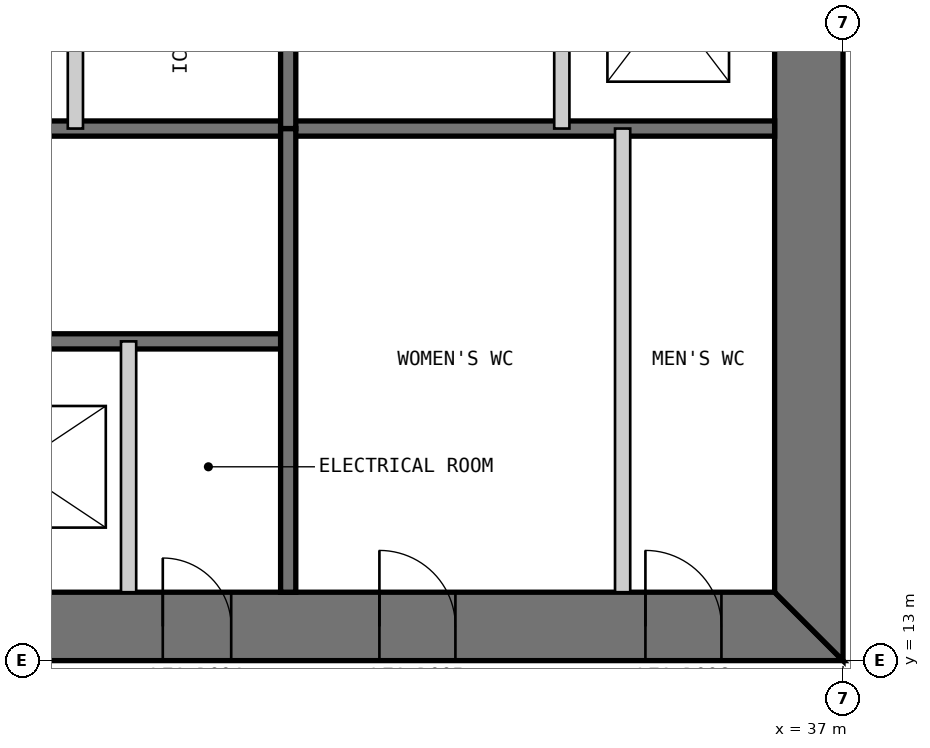
"""IFC4 building model, lengths in metres.
Left out: names, types, materials, properties, quantities, classifications, styles, units other than length and angle.
Written with IfcOpenShell. Run it as: python <this file> out.ifc"""

import sys

from ifc_helpers import new_model, si_unit, direction, frame, frame_2d, origin, place, context, subcontext, project, spatial, polyline, rectangle, outline, extrude, element, fill, save


model = new_model("IFC4")
c1 = context("Model", 3, precision=1e-05, world=origin(), true_north=direction((0.0, 1.0)))
c2 = subcontext(c1, "Body", "Model", "MODEL_VIEW")
j1 = project(units=[si_unit("LENGTHUNIT", "METRE"), si_unit("PLANEANGLEUNIT", "RADIAN")], contexts=[c1])
p1 = place(None, origin())
s1 = spatial("IfcSite", under=j1, at=p1, CompositionType="ELEMENT")
p2 = place(p1, origin())
s2 = spatial("IfcBuilding", under=s1, at=p2, CompositionType="ELEMENT")
p3 = place(p2, frame((0.0, 0.0, 293.4)))
s3 = spatial("IfcBuildingStorey", under=s2, at=p3, CompositionType="ELEMENT", Elevation=293.4)
p4 = place(p3, frame((13.0, 13.45, 0.0), z_axis=(0.0, 0.0, 1.0), x_axis=(1.0, 0.0, 0.0)))
e1 = element("IfcWall", 1, at=p4, inside=s3, PredefinedType="SHEAR", context=c2, shape_type="SweptSolid", body=[
    extrude(outline(polyline([(0.0, -0.45), (24.0, -0.45), (23.1, 0.45), (0.9, 0.45), (0.0, -0.45)])), origin(), (0.0, 0.0, 1.0), 3.4),
])
p5 = place(p4, frame((4.9, 0.0, 0.0)))
e2 = element("IfcOpeningElement", 2, at=p5, cuts=e1, PredefinedType="OPENING", context=c2, shape_type="SweptSolid", body=[
    extrude(rectangle(XDim=1.0, YDim=2.2, at=frame_2d((0.5, 1.1))), frame((0.0, 0.46, 0.0), z_axis=(0.0, -1.0, 0.0), x_axis=(1.0, 0.0, 0.0)), (0.0, 0.0, 1.0), 0.92),
])
p6 = place(p4, frame((8.9, 0.0, 0.0)))
e3 = element("IfcOpeningElement", 3, at=p6, cuts=e1, PredefinedType="OPENING", context=c2, shape_type="SweptSolid", body=[
    extrude(rectangle(XDim=1.1, YDim=2.2, at=frame_2d((0.55, 1.1))), frame((0.0, 0.46, 0.0), z_axis=(0.0, -1.0, 0.0), x_axis=(1.0, 0.0, 0.0)), (0.0, 0.0, 1.0), 0.92),
])
p7 = place(p4, frame((15.05, 0.0, 0.0)))
e4 = element("IfcOpeningElement", 4, at=p7, cuts=e1, PredefinedType="OPENING", context=c2, shape_type="SweptSolid", body=[
    extrude(rectangle(XDim=0.9, YDim=2.2, at=frame_2d((0.45, 1.1))), frame((0.0, 0.46, 0.0), z_axis=(0.0, -1.0, 0.0), x_axis=(1.0, 0.0, 0.0)), (0.0, 0.0, 1.0), 0.92),
])
p8 = place(p4, frame((17.9, 0.0, 0.0)))
e5 = element("IfcOpeningElement", 5, at=p8, cuts=e1, PredefinedType="OPENING", context=c2, shape_type="SweptSolid", body=[
    extrude(rectangle(XDim=1.0, YDim=2.2, at=frame_2d((0.5, 1.1))), frame((0.0, 0.46, 0.0), z_axis=(0.0, -1.0, 0.0), x_axis=(1.0, 0.0, 0.0)), (0.0, 0.0, 1.0), 0.92),
])
p9 = place(p4, frame((21.4, 0.0, 0.0)))
e6 = element("IfcOpeningElement", 6, at=p9, cuts=e1, PredefinedType="OPENING", context=c2, shape_type="SweptSolid", body=[
    extrude(rectangle(XDim=1.0, YDim=2.2, at=frame_2d((0.5, 1.1))), frame((0.0, 0.46, 0.0), z_axis=(0.0, -1.0, 0.0), x_axis=(1.0, 0.0, 0.0)), (0.0, 0.0, 1.0), 0.92),
])
p10 = place(p3, frame((36.55, 13.9, 0.0), z_axis=(0.0, 0.0, 1.0), x_axis=(0.0, 1.0, 0.0)))
e7 = element("IfcWall", 7, at=p10, inside=s3, PredefinedType="SHEAR", context=c2, shape_type="SweptSolid", body=[
    extrude(outline(polyline([(-0.9, -0.45), (23.1, -0.45), (22.2, 0.45), (0.0, 0.45), (-0.9, -0.45)])), origin(), (0.0, 0.0, 1.0), 3.4),
])
p11 = place(p10, frame((20.2, 0.0, 0.0)))
e8 = element("IfcOpeningElement", 8, at=p11, cuts=e7, PredefinedType="OPENING", context=c2, shape_type="SweptSolid", body=[
    extrude(rectangle(XDim=1.0, YDim=2.2, at=frame_2d((0.5, 1.1))), frame((0.0, 0.46, 0.0), z_axis=(0.0, -1.0, 0.0), x_axis=(1.0, 0.0, 0.0)), (0.0, 0.0, 1.0), 0.92),
])
p12 = place(p10, frame((17.25, 0.0, 0.0)))
e9 = element("IfcOpeningElement", 9, at=p12, cuts=e7, PredefinedType="OPENING", context=c2, shape_type="SweptSolid", body=[
    extrude(rectangle(XDim=0.9, YDim=2.2, at=frame_2d((0.45, 1.1))), frame((0.0, 0.46, 0.0), z_axis=(0.0, -1.0, 0.0), x_axis=(1.0, 0.0, 0.0)), (0.0, 0.0, 1.0), 0.92),
])
p13 = place(p3, frame((20.3, 17.2, 0.0), z_axis=(0.0, 0.0, 1.0), x_axis=(1.0, 0.0, 0.0)))
e10 = element("IfcWall", 10, at=p13, inside=s3, PredefinedType="SOLIDWALL", context=c2, shape_type="SweptSolid", body=[
    extrude(rectangle(XDim=9.4, YDim=0.2, at=frame_2d((4.7, 0.0))), origin(), (0.0, 0.0, 1.0), 3.2),
])
p14 = place(p13, frame((0.25, 0.0, 0.0)))
e11 = element("IfcOpeningElement", 11, at=p14, cuts=e10, PredefinedType="OPENING", context=c2, shape_type="SweptSolid", body=[
    extrude(rectangle(XDim=1.0, YDim=2.2, at=frame_2d((0.5, 1.1))), frame((0.0, 0.11, 0.0), z_axis=(0.0, -1.0, 0.0), x_axis=(1.0, 0.0, 0.0)), (0.0, 0.0, 1.0), 0.22),
])
p15 = place(p3, frame((20.3, 20.0, 0.0), z_axis=(0.0, 0.0, 1.0), x_axis=(1.0, 0.0, 0.0)))
e12 = element("IfcWall", 12, at=p15, inside=s3, PredefinedType="SOLIDWALL", context=c2, shape_type="SweptSolid", body=[
    extrude(rectangle(XDim=15.8, YDim=0.2, at=frame_2d((7.9, 0.0))), origin(), (0.0, 0.0, 1.0), 3.2),
])
p16 = place(p3, frame((27.6, 13.9, 0.0), z_axis=(0.0, 0.0, 1.0), x_axis=(0.0, 1.0, 0.0)))
e13 = element("IfcWall", 13, at=p16, inside=s3, PredefinedType="PARTITIONING", context=c2, shape_type="SweptSolid", body=[
    extrude(rectangle(XDim=3.3, YDim=0.2, at=frame_2d((1.65, 0.0))), origin(), (0.0, 0.0, 1.0), 3.2),
])
p17 = place(p3, frame((29.7, 13.9, 0.0), z_axis=(0.0, 0.0, 1.0), x_axis=(0.0, 1.0, 0.0)))
e14 = element("IfcWall", 14, at=p17, inside=s3, PredefinedType="SOLIDWALL", context=c2, shape_type="SweptSolid", body=[
    extrude(rectangle(XDim=6.1, YDim=0.2, at=frame_2d((3.05, 0.0))), origin(), (0.0, 0.0, 1.0), 3.2),
])
p18 = place(p3, frame((34.1, 13.9, 0.0), z_axis=(0.0, 0.0, 1.0), x_axis=(0.0, 1.0, 0.0)))
e15 = element("IfcWall", 15, at=p18, inside=s3, PredefinedType="PARTITIONING", context=c2, shape_type="SweptSolid", body=[
    extrude(rectangle(XDim=6.1, YDim=0.2, at=frame_2d((3.05, 0.0))), origin(), (0.0, 0.0, 1.0), 3.2),
])
p19 = place(p3, frame((33.3, 36.1, 0.0), z_axis=(0.0, 0.0, 1.0), x_axis=(0.0, -1.0, 0.0)))
e16 = element("IfcWall", 16, at=p19, inside=s3, PredefinedType="PARTITIONING", context=c2, shape_type="SweptSolid", body=[
    extrude(rectangle(XDim=16.1, YDim=0.2, at=frame_2d((8.05, 0.0))), origin(), (0.0, 0.0, 1.0), 3.2),
])
p20 = place(p19, frame((4.1, 0.0, 0.0)))
e17 = element("IfcOpeningElement", 17, at=p20, cuts=e16, PredefinedType="OPENING", context=c2, shape_type="SweptSolid", body=[
    extrude(rectangle(XDim=0.9, YDim=2.2, at=frame_2d((0.45, 1.1))), frame((0.0, 0.11, 0.0), z_axis=(0.0, -1.0, 0.0), x_axis=(1.0, 0.0, 0.0)), (0.0, 0.0, 1.0), 0.22),
])
p21 = place(p19, frame((7.217, 0.0, 0.0)))
e18 = element("IfcOpeningElement", 18, at=p21, cuts=e16, PredefinedType="OPENING", context=c2, shape_type="SweptSolid", body=[
    extrude(rectangle(XDim=1.1, YDim=2.2, at=frame_2d((0.55, 1.1))), frame((0.0, 0.11, 0.0), z_axis=(0.0, -1.0, 0.0), x_axis=(1.0, 0.0, 0.0)), (0.0, 0.0, 1.0), 0.22),
])
p22 = place(p19, frame((10.55, 0.0, 0.0)))
e19 = element("IfcOpeningElement", 19, at=p22, cuts=e16, PredefinedType="OPENING", context=c2, shape_type="SweptSolid", body=[
    extrude(rectangle(XDim=1.1, YDim=2.2, at=frame_2d((0.55, 1.1))), frame((0.0, 0.11, 0.0), z_axis=(0.0, -1.0, 0.0), x_axis=(1.0, 0.0, 0.0)), (0.0, 0.0, 1.0), 0.22),
])
p23 = place(p19, frame((13.883, 0.0, 0.0)))
e20 = element("IfcOpeningElement", 20, at=p23, cuts=e16, PredefinedType="OPENING", context=c2, shape_type="SweptSolid", body=[
    extrude(rectangle(XDim=1.1, YDim=2.2, at=frame_2d((0.55, 1.1))), frame((0.0, 0.11, 0.0), z_axis=(0.0, -1.0, 0.0), x_axis=(1.0, 0.0, 0.0)), (0.0, 0.0, 1.0), 0.22),
])
p24 = place(p3, frame((29.7, 36.1, 0.0), z_axis=(0.0, 0.0, 1.0), x_axis=(0.0, -1.0, 0.0)))
e21 = element("IfcWall", 21, at=p24, inside=s3, PredefinedType="SOLIDWALL", context=c2, shape_type="SweptSolid", body=[
    extrude(rectangle(XDim=16.1, YDim=0.2, at=frame_2d((8.05, 0.0))), origin(), (0.0, 0.0, 1.0), 3.2),
])
p25 = place(p24, frame((8.4, 0.0, 0.0)))
e22 = element("IfcOpeningElement", 22, at=p25, cuts=e21, PredefinedType="OPENING", context=c2, shape_type="SweptSolid", body=[
    extrude(rectangle(XDim=0.9, YDim=2.2, at=frame_2d((0.45, 1.1))), frame((0.0, 0.11, 0.0), z_axis=(0.0, -1.0, 0.0), x_axis=(1.0, 0.0, 0.0)), (0.0, 0.0, 1.0), 0.22),
])
p26 = place(p24, frame((13.4, 0.0, 0.0)))
e23 = element("IfcOpeningElement", 23, at=p26, cuts=e21, PredefinedType="OPENING", context=c2, shape_type="SweptSolid", body=[
    extrude(rectangle(XDim=0.9, YDim=2.2, at=frame_2d((0.45, 1.1))), frame((0.0, 0.11, 0.0), z_axis=(0.0, -1.0, 0.0), x_axis=(1.0, 0.0, 0.0)), (0.0, 0.0, 1.0), 0.22),
])
p27 = place(p3, frame((26.9, 30.0, 0.0), z_axis=(0.0, 0.0, 1.0), x_axis=(0.0, -1.0, 0.0)))
e24 = element("IfcWall", 24, at=p27, inside=s3, PredefinedType="PARTITIONING", context=c2, shape_type="SweptSolid", body=[
    extrude(rectangle(XDim=10.0, YDim=0.2, at=frame_2d((5.0, 0.0))), origin(), (0.0, 0.0, 1.0), 3.2),
])
p28 = place(p7, origin())
e25 = element("IfcDoor", 25, at=p28, inside=s3, OperationType="SINGLE_SWING_LEFT", PredefinedType="DOOR", context=c2, shape_type="SweptSolid", body=[
    extrude(rectangle(XDim=0.9, YDim=2.2, at=frame_2d((0.45, 1.1))), frame((0.0, 0.025, 0.0), z_axis=(0.0, -1.0, 0.0), x_axis=(1.0, 0.0, 0.0)), (0.0, 0.0, 1.0), 0.05),
    extrude(outline(polyline([(0.0, 0.0), (0.04, 0.0), (0.04, 2.16), (0.86, 2.16), (0.86, 0.0), (0.9, 0.0), (0.9, 2.2), (0.0, 2.2), (0.0, 0.0)])), frame((0.0, 0.3, 0.0), z_axis=(0.0, -1.0, 0.0), x_axis=(1.0, 0.0, 0.0)), (0.0, 0.0, 1.0), 0.6),
])
fill(e4, e25)
p29 = place(p8, origin())
e26 = element("IfcDoor", 26, at=p29, inside=s3, OperationType="SINGLE_SWING_LEFT", PredefinedType="DOOR", context=c2, shape_type="SweptSolid", body=[
    extrude(rectangle(XDim=1.0, YDim=2.2, at=frame_2d((0.5, 1.1))), frame((0.0, 0.025, 0.0), z_axis=(0.0, -1.0, 0.0), x_axis=(1.0, 0.0, 0.0)), (0.0, 0.0, 1.0), 0.05),
    extrude(outline(polyline([(0.0, 0.0), (0.04, 0.0), (0.04, 2.16), (0.96, 2.16), (0.96, 0.0), (1.0, 0.0), (1.0, 2.2), (0.0, 2.2), (0.0, 0.0)])), frame((0.0, 0.3, 0.0), z_axis=(0.0, -1.0, 0.0), x_axis=(1.0, 0.0, 0.0)), (0.0, 0.0, 1.0), 0.6),
])
fill(e5, e26)
p30 = place(p9, origin())
e27 = element("IfcDoor", 27, at=p30, inside=s3, OperationType="SINGLE_SWING_LEFT", PredefinedType="DOOR", context=c2, shape_type="SweptSolid", body=[
    extrude(rectangle(XDim=1.0, YDim=2.2, at=frame_2d((0.5, 1.1))), frame((0.0, 0.025, 0.0), z_axis=(0.0, -1.0, 0.0), x_axis=(1.0, 0.0, 0.0)), (0.0, 0.0, 1.0), 0.05),
    extrude(outline(polyline([(0.0, 0.0), (0.04, 0.0), (0.04, 2.16), (0.96, 2.16), (0.96, 0.0), (1.0, 0.0), (1.0, 2.2), (0.0, 2.2), (0.0, 0.0)])), frame((0.0, 0.3, 0.0), z_axis=(0.0, -1.0, 0.0), x_axis=(1.0, 0.0, 0.0)), (0.0, 0.0, 1.0), 0.6),
])
fill(e6, e27)
save(model, sys.argv[1])
